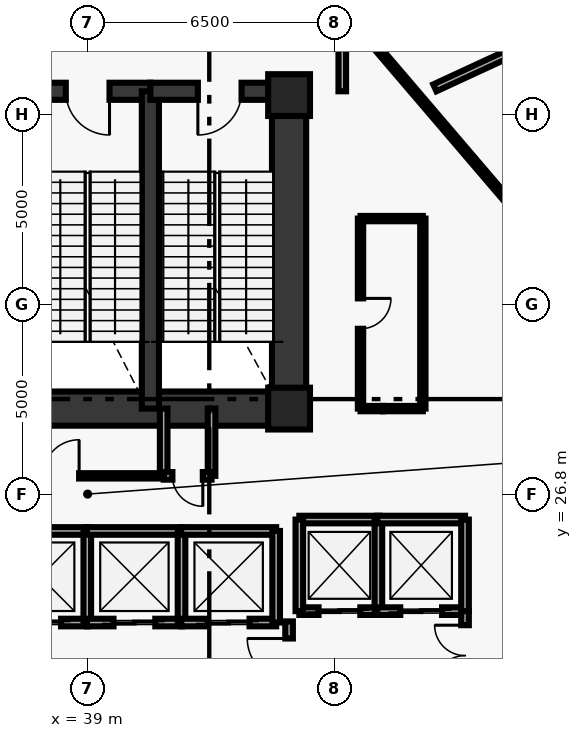
"""IFC4 building model, lengths in metres.
Left out: names, types, materials, properties, quantities, classifications, styles, units other than length and angle.
Written with IfcOpenShell. Run it as: python <this file> out.ifc"""

import sys

from ifc_helpers import new_model, si_unit, direction, frame, frame_2d, origin, origin_2d, place, context, subcontext, project, spatial, rectangle, extrude, element, fill, save


model = new_model("IFC4")
c1 = context("Model", 3, precision=1e-05, world=origin(), true_north=direction((0.0, 1.0)))
c2 = subcontext(c1, "Body", "Model", "MODEL_VIEW")
j1 = project(units=[si_unit("LENGTHUNIT", "METRE"), si_unit("PLANEANGLEUNIT", "RADIAN")], contexts=[c1])
p1 = place(None, origin())
s1 = spatial("IfcSite", under=j1, at=p1, CompositionType="ELEMENT")
p2 = place(p1, origin())
s2 = spatial("IfcBuilding", under=s1, at=p2, CompositionType="ELEMENT")
p3 = place(p2, origin())
s3 = spatial("IfcBuildingStorey", under=s2, at=p3, CompositionType="ELEMENT", Elevation=0.0)
for number, where, z_axis, x_axis in (
    (1, (44.3, 29.05, 0.0), (0.0, 0.0, 1.0), (1.0, 0.0, 0.0)),
    (2, (44.3, 37.3, 0.0), (0.0, 0.0, 1.0), (1.0, 0.0, 0.0)),
):
    element("IfcColumn", number, at=place(p3, frame(where, z_axis=z_axis, x_axis=x_axis)), inside=s3, PredefinedType="PILASTER", context=c2, shape_type="SweptSolid", body=[
        extrude(rectangle(XDim=1.1, YDim=1.1, at=origin_2d()), origin(), (0.0, 0.0, 1.0), 5.7),
    ])
p4 = place(p3, frame((44.3, 29.05, 0.0), z_axis=(0.0, 0.0, 1.0), x_axis=(0.0, 1.0, 0.0)))
e3 = element("IfcWall", 3, at=p4, inside=s3, PredefinedType="SHEAR", context=c2, shape_type="SweptSolid", body=[
    extrude(rectangle(XDim=8.35, YDim=0.9, at=frame_2d((4.175, 0.0))), origin(), (0.0, 0.0, 1.0), 5.7),
])
p5 = place(p3, frame((33.7, 29.05, 0.0), z_axis=(0.0, 0.0, 1.0), x_axis=(1.0, 0.0, 0.0)))
e4 = element("IfcWall", 4, at=p5, inside=s3, PredefinedType="SHEAR", context=c2, shape_type="SweptSolid", body=[
    extrude(rectangle(XDim=10.6, YDim=0.9, at=frame_2d((5.3, 0.0))), origin(), (0.0, 0.0, 1.0), 5.7),
])
p6 = place(p3, frame((37.35, 37.4, 0.0), z_axis=(0.0, 0.0, 1.0), x_axis=(1.0, 0.0, 0.0)))
e5 = element("IfcWall", 5, at=p6, inside=s3, PredefinedType="SHEAR", context=c2, shape_type="SweptSolid", body=[
    extrude(rectangle(XDim=3.3, YDim=0.45, at=frame_2d((1.65, 0.0))), origin(), (0.0, 0.0, 1.0), 5.7),
])
p7 = place(p6, frame((1.075, 0.0, 0.0)))
e6 = element("IfcOpeningElement", 6, at=p7, cuts=e5, PredefinedType="OPENING", context=c2, shape_type="SweptSolid", body=[
    extrude(rectangle(XDim=1.15, YDim=2.15, at=frame_2d((0.575, 1.075))), frame((0.0, 0.235, 0.0), z_axis=(0.0, -1.0, 0.0), x_axis=(1.0, 0.0, 0.0)), (0.0, 0.0, 1.0), 0.47),
])
p8 = place(p3, frame((40.65, 29.05, 0.0), z_axis=(0.0, 0.0, 1.0), x_axis=(0.0, 1.0, 0.0)))
e7 = element("IfcWall", 7, at=p8, inside=s3, PredefinedType="SHEAR", context=c2, shape_type="SweptSolid", body=[
    extrude(rectangle(XDim=8.35, YDim=0.45, at=frame_2d((4.175, 0.0))), origin(), (0.0, 0.0, 1.0), 5.7),
])
p9 = place(p3, frame((40.65, 37.4, 0.0), z_axis=(0.0, 0.0, 1.0), x_axis=(1.0, 0.0, 0.0)))
e8 = element("IfcWall", 8, at=p9, inside=s3, PredefinedType="SHEAR", context=c2, shape_type="SweptSolid", body=[
    extrude(rectangle(XDim=3.65, YDim=0.45, at=frame_2d((1.825, 0.0))), origin(), (0.0, 0.0, 1.0), 5.7),
])
p10 = place(p9, frame((1.25, 0.0, 0.0)))
e9 = element("IfcOpeningElement", 9, at=p10, cuts=e8, PredefinedType="OPENING", context=c2, shape_type="SweptSolid", body=[
    extrude(rectangle(XDim=1.15, YDim=2.15, at=frame_2d((0.575, 1.075))), frame((0.0, 0.235, 0.0), z_axis=(0.0, -1.0, 0.0), x_axis=(1.0, 0.0, 0.0)), (0.0, 0.0, 1.0), 0.47),
])
p11 = place(p3, frame((45.7, 37.4, 0.0), z_axis=(0.0, 0.0, 1.0), x_axis=(0.0, 1.0, 0.0)))
e10 = element("IfcWall", 10, at=p11, inside=s3, PredefinedType="SOLIDWALL", context=c2, shape_type="SweptSolid", body=[
    extrude(rectangle(XDim=1.88, YDim=0.2, at=frame_2d((0.94, 0.0))), origin(), (0.0, 0.0, 1.0), 5.7),
])
for number, where, z_axis, x_axis in (
    (11, (41.0, 27.28, 0.0), (0.0, 0.0, 1.0), (0.0, 1.0, 0.0)),
    (12, (42.26, 27.28, 0.0), (0.0, 0.0, 1.0), (0.0, 1.0, 0.0)),
):
    element("IfcWall", number, at=place(p3, frame(where, z_axis=z_axis, x_axis=x_axis)), inside=s3, PredefinedType="SOLIDWALL", context=c2, shape_type="SweptSolid", body=[
        extrude(rectangle(XDim=1.77, YDim=0.2, at=frame_2d((0.885, 0.0))), origin(), (0.0, 0.0, 1.0), 5.7),
    ])
p12 = place(p3, frame((41.0, 27.28, 0.0), z_axis=(0.0, 0.0, 1.0), x_axis=(1.0, 0.0, 0.0)))
e13 = element("IfcWall", 13, at=p12, inside=s3, PredefinedType="SOLIDWALL", context=c2, shape_type="SweptSolid", body=[
    extrude(rectangle(XDim=1.26, YDim=0.2, at=frame_2d((0.63, 0.0))), origin(), (0.0, 0.0, 1.0), 5.7),
])
p13 = place(p12, frame((0.23, 0.0, 0.0)))
e14 = element("IfcOpeningElement", 14, at=p13, cuts=e13, PredefinedType="OPENING", context=c2, shape_type="SweptSolid", body=[
    extrude(rectangle(XDim=0.8, YDim=2.05, at=frame_2d((0.4, 1.025))), frame((0.0, 0.11, 0.0), z_axis=(0.0, -1.0, 0.0), x_axis=(1.0, 0.0, 0.0)), (0.0, 0.0, 1.0), 0.22),
])
p14 = place(p3, frame((44.57, 23.72, 0.0), z_axis=(0.0, 0.0, 1.0), x_axis=(1.0, 0.0, 0.0)))
e15 = element("IfcWall", 15, at=p14, inside=s3, PredefinedType="SOLIDWALL", context=c2, shape_type="SweptSolid", body=[
    extrude(rectangle(XDim=2.11, YDim=0.2, at=frame_2d((1.055, 0.0))), origin(), (0.0, 0.0, 1.0), 5.7),
])
p15 = place(p14, frame((0.505, 0.0, 0.0)))
e16 = element("IfcOpeningElement", 16, at=p15, cuts=e15, PredefinedType="OPENING", context=c2, shape_type="SweptSolid", body=[
    extrude(rectangle(XDim=1.1, YDim=2.15, at=frame_2d((0.55, 1.075))), frame((0.0, 0.11, 0.0), z_axis=(0.0, -1.0, 0.0), x_axis=(1.0, 0.0, 0.0)), (0.0, 0.0, 1.0), 0.22),
])
p16 = place(p3, frame((44.57, 26.13, 0.0), z_axis=(0.0, 0.0, 1.0), x_axis=(1.0, 0.0, 0.0)))
e17 = element("IfcWall", 17, at=p16, inside=s3, PredefinedType="SOLIDWALL", context=c2, shape_type="SweptSolid", body=[
    extrude(rectangle(XDim=2.11, YDim=0.2, at=frame_2d((1.055, 0.0))), origin(), (0.0, 0.0, 1.0), 5.7),
])
for number, where, z_axis, x_axis in (
    (18, (44.57, 23.72, 0.0), (0.0, 0.0, 1.0), (0.0, 1.0, 0.0)),
    (19, (46.65, 23.72, 0.0), (0.0, 0.0, 1.0), (0.0, 1.0, 0.0)),
):
    element("IfcWall", number, at=place(p3, frame(where, z_axis=z_axis, x_axis=x_axis)), inside=s3, PredefinedType="SOLIDWALL", context=c2, shape_type="SweptSolid", body=[
        extrude(rectangle(XDim=2.41, YDim=0.2, at=frame_2d((1.205, 0.0))), origin(), (0.0, 0.0, 1.0), 5.7),
    ])
p17 = place(p3, frame((46.62, 23.72, 0.0), z_axis=(0.0, 0.0, 1.0), x_axis=(1.0, 0.0, 0.0)))
e20 = element("IfcWall", 20, at=p17, inside=s3, PredefinedType="SOLIDWALL", context=c2, shape_type="SweptSolid", body=[
    extrude(rectangle(XDim=2.31, YDim=0.2, at=frame_2d((1.155, 0.0))), origin(), (0.0, 0.0, 1.0), 5.7),
])
p18 = place(p17, frame((0.605, 0.0, 0.0)))
e21 = element("IfcOpeningElement", 21, at=p18, cuts=e20, PredefinedType="OPENING", context=c2, shape_type="SweptSolid", body=[
    extrude(rectangle(XDim=1.1, YDim=2.15, at=frame_2d((0.55, 1.075))), frame((0.0, 0.11, 0.0), z_axis=(0.0, -1.0, 0.0), x_axis=(1.0, 0.0, 0.0)), (0.0, 0.0, 1.0), 0.22),
])
p19 = place(p3, frame((46.62, 26.13, 0.0), z_axis=(0.0, 0.0, 1.0), x_axis=(1.0, 0.0, 0.0)))
e22 = element("IfcWall", 22, at=p19, inside=s3, PredefinedType="SOLIDWALL", context=c2, shape_type="SweptSolid", body=[
    extrude(rectangle(XDim=2.31, YDim=0.2, at=frame_2d((1.155, 0.0))), origin(), (0.0, 0.0, 1.0), 5.7),
])
p20 = place(p3, frame((48.93, 23.72, 0.0), z_axis=(0.0, 0.0, 1.0), x_axis=(0.0, 1.0, 0.0)))
e23 = element("IfcWall", 23, at=p20, inside=s3, PredefinedType="SOLIDWALL", context=c2, shape_type="SweptSolid", body=[
    extrude(rectangle(XDim=2.41, YDim=0.2, at=frame_2d((1.205, 0.0))), origin(), (0.0, 0.0, 1.0), 5.7),
])
p21 = place(p3, frame((36.5, 23.42, 0.0), z_axis=(0.0, 0.0, 1.0), x_axis=(1.0, 0.0, 0.0)))
e24 = element("IfcWall", 24, at=p21, inside=s3, PredefinedType="SOLIDWALL", context=c2, shape_type="SweptSolid", body=[
    extrude(rectangle(XDim=2.5, YDim=0.2, at=frame_2d((1.25, 0.0))), origin(), (0.0, 0.0, 1.0), 5.7),
])
p22 = place(p21, frame((0.7, 0.0, 0.0)))
e25 = element("IfcOpeningElement", 25, at=p22, cuts=e24, PredefinedType="OPENING", context=c2, shape_type="SweptSolid", body=[
    extrude(rectangle(XDim=1.1, YDim=2.15, at=frame_2d((0.55, 1.075))), frame((0.0, 0.11, 0.0), z_axis=(0.0, -1.0, 0.0), x_axis=(1.0, 0.0, 0.0)), (0.0, 0.0, 1.0), 0.22),
])
p23 = place(p3, frame((36.5, 25.83, 0.0), z_axis=(0.0, 0.0, 1.0), x_axis=(1.0, 0.0, 0.0)))
e26 = element("IfcWall", 26, at=p23, inside=s3, PredefinedType="SOLIDWALL", context=c2, shape_type="SweptSolid", body=[
    extrude(rectangle(XDim=2.5, YDim=0.2, at=frame_2d((1.25, 0.0))), origin(), (0.0, 0.0, 1.0), 5.7),
])
p24 = place(p3, frame((38.99, 23.42, 0.0), z_axis=(0.0, 0.0, 1.0), x_axis=(0.0, 1.0, 0.0)))
e27 = element("IfcWall", 27, at=p24, inside=s3, PredefinedType="SOLIDWALL", context=c2, shape_type="SweptSolid", body=[
    extrude(rectangle(XDim=2.41, YDim=0.2, at=frame_2d((1.205, 0.0))), origin(), (0.0, 0.0, 1.0), 5.7),
])
p25 = place(p3, frame((38.98, 23.42, 0.0), z_axis=(0.0, 0.0, 1.0), x_axis=(1.0, 0.0, 0.0)))
e28 = element("IfcWall", 28, at=p25, inside=s3, PredefinedType="SOLIDWALL", context=c2, shape_type="SweptSolid", body=[
    extrude(rectangle(XDim=2.5, YDim=0.2, at=frame_2d((1.25, 0.0))), origin(), (0.0, 0.0, 1.0), 5.7),
])
p26 = place(p25, frame((0.7, 0.0, 0.0)))
e29 = element("IfcOpeningElement", 29, at=p26, cuts=e28, PredefinedType="OPENING", context=c2, shape_type="SweptSolid", body=[
    extrude(rectangle(XDim=1.1, YDim=2.15, at=frame_2d((0.55, 1.075))), frame((0.0, 0.11, 0.0), z_axis=(0.0, -1.0, 0.0), x_axis=(1.0, 0.0, 0.0)), (0.0, 0.0, 1.0), 0.22),
])
p27 = place(p3, frame((38.98, 25.83, 0.0), z_axis=(0.0, 0.0, 1.0), x_axis=(1.0, 0.0, 0.0)))
e30 = element("IfcWall", 30, at=p27, inside=s3, PredefinedType="SOLIDWALL", context=c2, shape_type="SweptSolid", body=[
    extrude(rectangle(XDim=2.5, YDim=0.2, at=frame_2d((1.25, 0.0))), origin(), (0.0, 0.0, 1.0), 5.7),
])
p28 = place(p3, frame((41.47, 23.42, 0.0), z_axis=(0.0, 0.0, 1.0), x_axis=(0.0, 1.0, 0.0)))
e31 = element("IfcWall", 31, at=p28, inside=s3, PredefinedType="SOLIDWALL", context=c2, shape_type="SweptSolid", body=[
    extrude(rectangle(XDim=2.41, YDim=0.2, at=frame_2d((1.205, 0.0))), origin(), (0.0, 0.0, 1.0), 5.7),
])
p29 = place(p3, frame((41.46, 23.42, 0.0), z_axis=(0.0, 0.0, 1.0), x_axis=(1.0, 0.0, 0.0)))
e32 = element("IfcWall", 32, at=p29, inside=s3, PredefinedType="SOLIDWALL", context=c2, shape_type="SweptSolid", body=[
    extrude(rectangle(XDim=2.5, YDim=0.2, at=frame_2d((1.25, 0.0))), origin(), (0.0, 0.0, 1.0), 5.7),
])
p30 = place(p29, frame((0.7, 0.0, 0.0)))
e33 = element("IfcOpeningElement", 33, at=p30, cuts=e32, PredefinedType="OPENING", context=c2, shape_type="SweptSolid", body=[
    extrude(rectangle(XDim=1.1, YDim=2.15, at=frame_2d((0.55, 1.075))), frame((0.0, 0.11, 0.0), z_axis=(0.0, -1.0, 0.0), x_axis=(1.0, 0.0, 0.0)), (0.0, 0.0, 1.0), 0.22),
])
p31 = place(p3, frame((41.46, 25.83, 0.0), z_axis=(0.0, 0.0, 1.0), x_axis=(1.0, 0.0, 0.0)))
e34 = element("IfcWall", 34, at=p31, inside=s3, PredefinedType="SOLIDWALL", context=c2, shape_type="SweptSolid", body=[
    extrude(rectangle(XDim=2.5, YDim=0.2, at=frame_2d((1.25, 0.0))), origin(), (0.0, 0.0, 1.0), 5.7),
])
p32 = place(p3, frame((43.96, 23.42, 0.0), z_axis=(0.0, 0.0, 1.0), x_axis=(0.0, 1.0, 0.0)))
e35 = element("IfcWall", 35, at=p32, inside=s3, PredefinedType="SOLIDWALL", context=c2, shape_type="SweptSolid", body=[
    extrude(rectangle(XDim=2.41, YDim=0.2, at=frame_2d((1.205, 0.0))), origin(), (0.0, 0.0, 1.0), 5.7),
])
p33 = place(p3, frame((48.93, 23.72, 0.0), z_axis=(0.0, 0.0, 1.0), x_axis=(0.0, -1.0, 0.0)))
e36 = element("IfcWall", 36, at=p33, inside=s3, PredefinedType="SOLIDWALL", context=c2, shape_type="SweptSolid", body=[
    extrude(rectangle(XDim=2.34, YDim=0.2, at=frame_2d((1.17, 0.0))), origin(), (0.0, 0.0, 1.0), 5.7),
])
p34 = place(p33, frame((0.37, 0.0, 0.0)))
e37 = element("IfcOpeningElement", 37, at=p34, cuts=e36, PredefinedType="OPENING", context=c2, shape_type="SweptSolid", body=[
    extrude(rectangle(XDim=1.6, YDim=2.2, at=frame_2d((0.8, 1.1))), frame((0.0, 0.11, 0.0), z_axis=(0.0, -1.0, 0.0), x_axis=(1.0, 0.0, 0.0)), (0.0, 0.0, 1.0), 0.22),
])
p35 = place(p3, frame((44.3, 23.45, 0.0), z_axis=(0.0, 0.0, 1.0), x_axis=(0.0, -1.0, 0.0)))
e38 = element("IfcWall", 38, at=p35, inside=s3, PredefinedType="SOLIDWALL", context=c2, shape_type="SweptSolid", body=[
    extrude(rectangle(XDim=2.1, YDim=0.2, at=frame_2d((1.05, 0.0))), origin(), (0.0, 0.0, 1.0), 4.92),
])
p36 = place(p35, frame((0.45, 0.0, 0.0)))
e39 = element("IfcOpeningElement", 39, at=p36, cuts=e38, PredefinedType="OPENING", context=c2, shape_type="SweptSolid", body=[
    extrude(rectangle(XDim=1.1, YDim=2.15, at=frame_2d((0.55, 1.075))), frame((0.0, 0.11, 0.0), z_axis=(0.0, -1.0, 0.0), x_axis=(1.0, 0.0, 0.0)), (0.0, 0.0, 1.0), 0.22),
])
p37 = place(p3, frame((35.6, 27.28, 0.0), z_axis=(0.0, 0.0, 1.0), x_axis=(1.0, 0.0, 0.0)))
e40 = element("IfcWall", 40, at=p37, inside=s3, PredefinedType="PARTITIONING", context=c2, shape_type="SweptSolid", body=[
    extrude(rectangle(XDim=5.4, YDim=0.14, at=frame_2d((2.7, 0.0))), origin(), (0.0, 0.0, 1.0), 5.7),
])
p38 = place(p37, frame((2.225, 0.0, 0.0)))
e41 = element("IfcOpeningElement", 41, at=p38, cuts=e40, PredefinedType="OPENING", context=c2, shape_type="SweptSolid", body=[
    extrude(rectangle(XDim=0.95, YDim=2.1, at=frame_2d((0.475, 1.05))), frame((0.0, 0.08, 0.0), z_axis=(0.0, -1.0, 0.0), x_axis=(1.0, 0.0, 0.0)), (0.0, 0.0, 1.0), 0.16),
])
p39 = place(p3, frame((46.18, 34.05, 0.0), z_axis=(0.0, 0.0, 1.0), x_axis=(0.0, -1.0, 0.0)))
e42 = element("IfcWall", 42, at=p39, inside=s3, PredefinedType="PARTITIONING", context=c2, shape_type="SweptSolid", body=[
    extrude(rectangle(XDim=5.0, YDim=0.14, at=frame_2d((2.5, 0.0))), origin(), (0.0, 0.0, 1.0), 5.7),
])
p40 = place(p39, frame((2.1, 0.0, 0.0)))
e43 = element("IfcOpeningElement", 43, at=p40, cuts=e42, PredefinedType="OPENING", context=c2, shape_type="SweptSolid", body=[
    extrude(rectangle(XDim=0.8, YDim=2.05, at=frame_2d((0.4, 1.025))), frame((0.0, 0.08, 0.0), z_axis=(0.0, -1.0, 0.0), x_axis=(1.0, 0.0, 0.0)), (0.0, 0.0, 1.0), 0.16),
])
p41 = place(p3, frame((46.18, 29.05, 0.0), z_axis=(0.0, 0.0, 1.0), x_axis=(1.0, 0.0, 0.0)))
e44 = element("IfcWall", 44, at=p41, inside=s3, PredefinedType="PARTITIONING", context=c2, shape_type="SweptSolid", body=[
    extrude(rectangle(XDim=0.59, YDim=0.14, at=frame_2d((0.295, 0.0))), origin(), (0.0, 0.0, 1.0), 4.66),
])
p42 = place(p3, frame((46.77, 29.05, 0.0), z_axis=(0.0, 0.0, 1.0), x_axis=(1.0, 0.0, 0.0)))
e45 = element("IfcWall", 45, at=p42, inside=s3, PredefinedType="PARTITIONING", context=c2, shape_type="SweptSolid", body=[
    extrude(rectangle(XDim=1.05, YDim=0.14, at=frame_2d((0.525, 0.0))), origin(), (0.0, 0.0, 1.0), 5.7),
])
p43 = place(p3, frame((46.18, 34.05, 0.0), z_axis=(0.0, 0.0, 1.0), x_axis=(1.0, 0.0, 0.0)))
e46 = element("IfcWall", 46, at=p43, inside=s3, PredefinedType="PARTITIONING", context=c2, shape_type="SweptSolid", body=[
    extrude(rectangle(XDim=1.64, YDim=0.14, at=frame_2d((0.82, 0.0))), origin(), (0.0, 0.0, 1.0), 5.7),
])
p44 = place(p3, frame((47.82, 29.05, 0.0), z_axis=(0.0, 0.0, 1.0), x_axis=(0.0, 1.0, 0.0)))
e47 = element("IfcWall", 47, at=p44, inside=s3, PredefinedType="PARTITIONING", context=c2, shape_type="SweptSolid", body=[
    extrude(rectangle(XDim=5.0, YDim=0.14, at=frame_2d((2.5, 0.0))), origin(), (0.0, 0.0, 1.0), 5.7),
])
p45 = place(p3, frame((50.189, 34.36, 0.0), z_axis=(0.0, 0.0, 1.0), x_axis=(-0.649652680018, 0.760231145998, 0.0)))
e48 = element("IfcWall", 48, at=p45, inside=s3, PredefinedType="PARTITIONING", context=c2, shape_type="SweptSolid", body=[
    extrude(rectangle(XDim=7.279, YDim=0.16, at=frame_2d((3.64, 0.0))), origin(), (0.0, 0.0, 1.0), 5.7),
])
p46 = place(p3, frame((48.136, 37.491, 0.0), z_axis=(0.0, 0.0, 1.0), x_axis=(0.907524785669, 0.419998527851, 0.0)))
e49 = element("IfcWall", 49, at=p46, inside=s3, PredefinedType="PARTITIONING", context=c2, shape_type="SweptSolid", body=[
    extrude(rectangle(XDim=5.3, YDim=0.2, at=frame_2d((2.65, 0.0))), origin(), (0.0, 0.0, 1.0), 5.7),
])
p47 = place(p7, origin())
e50 = element("IfcDoor", 50, at=p47, inside=s3, OperationType="SINGLE_SWING_RIGHT", PredefinedType="DOOR", context=c2, shape_type="SweptSolid", body=[
    extrude(rectangle(XDim=1.15, YDim=2.15, at=frame_2d((0.575, 1.075))), frame((0.0, 0.025, 0.0), z_axis=(0.0, -1.0, 0.0), x_axis=(1.0, 0.0, 0.0)), (0.0, 0.0, 1.0), 0.05),
])
fill(e6, e50)
p48 = place(p10, origin())
e51 = element("IfcDoor", 51, at=p48, inside=s3, OperationType="SINGLE_SWING_LEFT", PredefinedType="DOOR", context=c2, shape_type="SweptSolid", body=[
    extrude(rectangle(XDim=1.15, YDim=2.15, at=frame_2d((0.575, 1.075))), frame((0.0, 0.025, 0.0), z_axis=(0.0, -1.0, 0.0), x_axis=(1.0, 0.0, 0.0)), (0.0, 0.0, 1.0), 0.05),
])
fill(e9, e51)
p49 = place(p13, origin())
e52 = element("IfcDoor", 52, at=p49, inside=s3, OperationType="SINGLE_SWING_RIGHT", PredefinedType="DOOR", context=c2, shape_type="SweptSolid", body=[
    extrude(rectangle(XDim=0.8, YDim=2.05, at=frame_2d((0.4, 1.025))), frame((0.0, 0.025, 0.0), z_axis=(0.0, -1.0, 0.0), x_axis=(1.0, 0.0, 0.0)), (0.0, 0.0, 1.0), 0.05),
])
fill(e14, e52)
p50 = place(p15, origin())
e53 = element("IfcDoor", 53, at=p50, inside=s3, OperationType="DOUBLE_DOOR_SLIDING", PredefinedType="DOOR", context=c2, shape_type="SweptSolid", body=[
    extrude(rectangle(XDim=1.1, YDim=2.15, at=frame_2d((0.55, 1.075))), frame((0.0, 0.025, 0.0), z_axis=(0.0, -1.0, 0.0), x_axis=(1.0, 0.0, 0.0)), (0.0, 0.0, 1.0), 0.05),
])
fill(e16, e53)
p51 = place(p18, origin())
e54 = element("IfcDoor", 54, at=p51, inside=s3, OperationType="DOUBLE_DOOR_SLIDING", PredefinedType="DOOR", context=c2, shape_type="SweptSolid", body=[
    extrude(rectangle(XDim=1.1, YDim=2.15, at=frame_2d((0.55, 1.075))), frame((0.0, 0.025, 0.0), z_axis=(0.0, -1.0, 0.0), x_axis=(1.0, 0.0, 0.0)), (0.0, 0.0, 1.0), 0.05),
])
fill(e21, e54)
p52 = place(p22, origin())
e55 = element("IfcDoor", 55, at=p52, inside=s3, OperationType="DOUBLE_DOOR_SLIDING", PredefinedType="DOOR", context=c2, shape_type="SweptSolid", body=[
    extrude(rectangle(XDim=1.1, YDim=2.15, at=frame_2d((0.55, 1.075))), frame((0.0, 0.025, 0.0), z_axis=(0.0, -1.0, 0.0), x_axis=(1.0, 0.0, 0.0)), (0.0, 0.0, 1.0), 0.05),
])
fill(e25, e55)
p53 = place(p26, origin())
e56 = element("IfcDoor", 56, at=p53, inside=s3, OperationType="DOUBLE_DOOR_SLIDING", PredefinedType="DOOR", context=c2, shape_type="SweptSolid", body=[
    extrude(rectangle(XDim=1.1, YDim=2.15, at=frame_2d((0.55, 1.075))), frame((0.0, 0.025, 0.0), z_axis=(0.0, -1.0, 0.0), x_axis=(1.0, 0.0, 0.0)), (0.0, 0.0, 1.0), 0.05),
])
fill(e29, e56)
p54 = place(p30, origin())
e57 = element("IfcDoor", 57, at=p54, inside=s3, OperationType="DOUBLE_DOOR_SLIDING", PredefinedType="DOOR", context=c2, shape_type="SweptSolid", body=[
    extrude(rectangle(XDim=1.1, YDim=2.15, at=frame_2d((0.55, 1.075))), frame((0.0, 0.025, 0.0), z_axis=(0.0, -1.0, 0.0), x_axis=(1.0, 0.0, 0.0)), (0.0, 0.0, 1.0), 0.05),
])
fill(e33, e57)
p55 = place(p34, origin())
e58 = element("IfcDoor", 58, at=p55, inside=s3, OperationType="DOUBLE_DOOR_SINGLE_SWING", PredefinedType="DOOR", context=c2, shape_type="SweptSolid", body=[
    extrude(rectangle(XDim=1.6, YDim=2.2, at=frame_2d((0.8, 1.1))), frame((0.0, 0.025, 0.0), z_axis=(0.0, -1.0, 0.0), x_axis=(1.0, 0.0, 0.0)), (0.0, 0.0, 1.0), 0.05),
])
fill(e37, e58)
p56 = place(p36, origin())
e59 = element("IfcDoor", 59, at=p56, inside=s3, OperationType="SINGLE_SWING_LEFT", PredefinedType="DOOR", context=c2, shape_type="SweptSolid", body=[
    extrude(rectangle(XDim=1.1, YDim=2.15, at=frame_2d((0.55, 1.075))), frame((0.0, 0.025, 0.0), z_axis=(0.0, -1.0, 0.0), x_axis=(1.0, 0.0, 0.0)), (0.0, 0.0, 1.0), 0.05),
])
fill(e39, e59)
p57 = place(p38, origin())
e60 = element("IfcDoor", 60, at=p57, inside=s3, OperationType="SINGLE_SWING_RIGHT", PredefinedType="DOOR", context=c2, shape_type="SweptSolid", body=[
    extrude(rectangle(XDim=0.95, YDim=2.1, at=frame_2d((0.475, 1.05))), frame((0.0, 0.025, 0.0), z_axis=(0.0, -1.0, 0.0), x_axis=(1.0, 0.0, 0.0)), (0.0, 0.0, 1.0), 0.05),
])
fill(e41, e60)
p58 = place(p40, origin())
e61 = element("IfcDoor", 61, at=p58, inside=s3, OperationType="SINGLE_SWING_LEFT", PredefinedType="DOOR", context=c2, shape_type="SweptSolid", body=[
    extrude(rectangle(XDim=0.8, YDim=2.05, at=frame_2d((0.4, 1.025))), frame((0.0, 0.025, 0.0), z_axis=(0.0, -1.0, 0.0), x_axis=(1.0, 0.0, 0.0)), (0.0, 0.0, 1.0), 0.05),
])
fill(e43, e61)
save(model, sys.argv[1])
